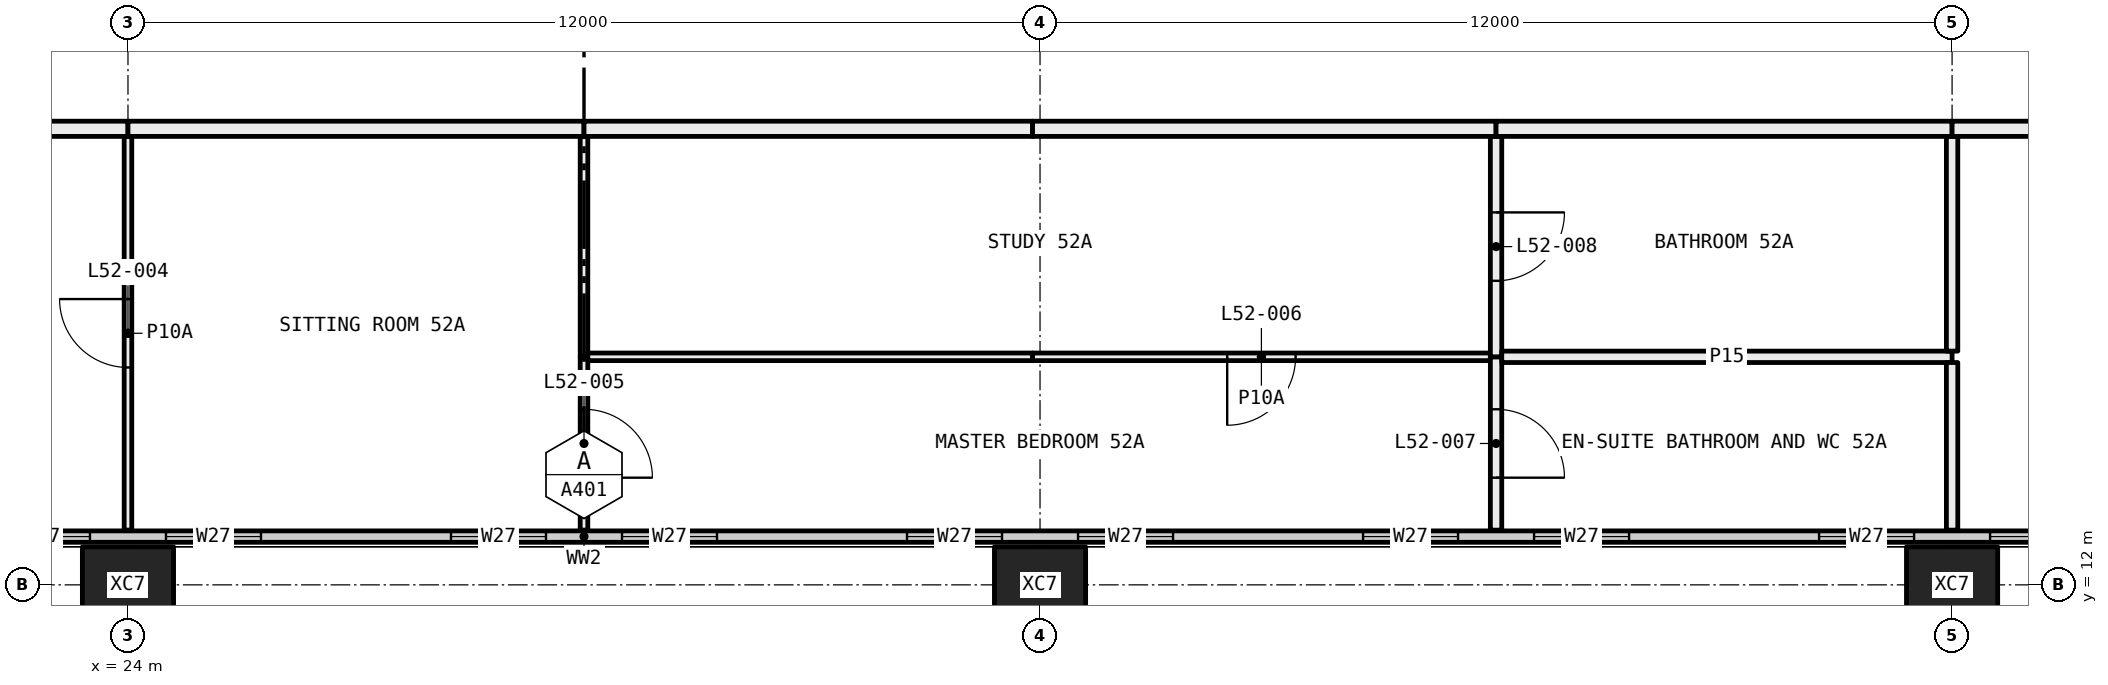
"""IFC4 building model, lengths in metres.
Left out: names, types, materials, properties, quantities, classifications, styles, units other than length and angle.
Written with IfcOpenShell. Run it as: python <this file> out.ifc"""

import sys

from ifc_helpers import new_model, si_unit, direction, frame, frame_2d, origin, origin_2d, place, context, subcontext, project, spatial, rectangle, hollow_rectangle, extrude, element, fill, save


model = new_model("IFC4")
c1 = context("Model", 3, precision=1e-05, world=origin(), true_north=direction((0.0, 1.0)))
c2 = subcontext(c1, "Body", "Model", "MODEL_VIEW")
j1 = project(units=[si_unit("LENGTHUNIT", "METRE"), si_unit("PLANEANGLEUNIT", "RADIAN")], contexts=[c1])
p1 = place(None, origin())
s1 = spatial("IfcSite", under=j1, at=p1, CompositionType="ELEMENT")
p2 = place(p1, origin())
s2 = spatial("IfcBuilding", under=s1, at=p2, CompositionType="ELEMENT")
p3 = place(p2, frame((0.0, 0.0, 196.2)))
s3 = spatial("IfcBuildingStorey", under=s2, at=p3, CompositionType="ELEMENT", Elevation=196.2)
for number, where, z_axis, x_axis in (
    (1, (24.0, 12.0, -0.4), (0.0, 0.0, 1.0), (1.0, 0.0, 0.0)),
    (2, (36.0, 12.0, -0.4), (0.0, 0.0, 1.0), (1.0, 0.0, 0.0)),
    (3, (48.0, 12.0, -0.4), (0.0, 0.0, 1.0), (1.0, 0.0, 0.0)),
):
    element("IfcColumn", number, at=place(p3, frame(where, z_axis=z_axis, x_axis=x_axis)), inside=s3, PredefinedType="COLUMN", context=c2, shape_type="SweptSolid", body=[
        extrude(hollow_rectangle(XDim=1.2, YDim=1.0, WallThickness=0.045, at=origin_2d()), origin(), (0.0, 0.0, 1.0), 3.45),
    ])
p4 = place(p3, frame((6.56, 12.635, 0.0), z_axis=(0.0, 0.0, 1.0), x_axis=(1.0, 0.0, 0.0)))
e4 = element("IfcWall", 4, at=p4, inside=s3, PredefinedType="ELEMENTEDWALL", context=c2, shape_type="SweptSolid", body=[
    extrude(rectangle(XDim=46.88, YDim=0.15, at=frame_2d((23.44, 0.0))), origin(), (0.0, 0.0, 1.0), 3.05),
])
p5 = place(p4, frame((0.44, 0.0, 0.45)))
e5 = element("IfcOpeningElement", 5, at=p5, cuts=e4, PredefinedType="OPENING", context=c2, shape_type="SweptSolid", body=[
    extrude(rectangle(XDim=4.5, YDim=2.55, at=frame_2d((2.25, 1.275))), frame((0.0, 0.085, 0.0), z_axis=(0.0, -1.0, 0.0), x_axis=(1.0, 0.0, 0.0)), (0.0, 0.0, 1.0), 0.17),
])
p6 = place(p4, frame((5.94, 0.0, 0.45)))
e6 = element("IfcOpeningElement", 6, at=p6, cuts=e4, PredefinedType="OPENING", context=c2, shape_type="SweptSolid", body=[
    extrude(rectangle(XDim=1.25, YDim=2.55, at=frame_2d((0.625, 1.275))), frame((0.0, 0.085, 0.0), z_axis=(0.0, -1.0, 0.0), x_axis=(1.0, 0.0, 0.0)), (0.0, 0.0, 1.0), 0.17),
])
p7 = place(p4, frame((9.69, 0.0, 0.45)))
e7 = element("IfcOpeningElement", 7, at=p7, cuts=e4, PredefinedType="OPENING", context=c2, shape_type="SweptSolid", body=[
    extrude(rectangle(XDim=1.25, YDim=2.55, at=frame_2d((0.625, 1.275))), frame((0.0, 0.085, 0.0), z_axis=(0.0, -1.0, 0.0), x_axis=(1.0, 0.0, 0.0)), (0.0, 0.0, 1.0), 0.17),
])
p8 = place(p4, frame((11.94, 0.0, 0.45)))
e8 = element("IfcOpeningElement", 8, at=p8, cuts=e4, PredefinedType="OPENING", context=c2, shape_type="SweptSolid", body=[
    extrude(rectangle(XDim=1.25, YDim=2.55, at=frame_2d((0.625, 1.275))), frame((0.0, 0.085, 0.0), z_axis=(0.0, -1.0, 0.0), x_axis=(1.0, 0.0, 0.0)), (0.0, 0.0, 1.0), 0.17),
])
p9 = place(p4, frame((15.69, 0.0, 0.45)))
e9 = element("IfcOpeningElement", 9, at=p9, cuts=e4, PredefinedType="OPENING", context=c2, shape_type="SweptSolid", body=[
    extrude(rectangle(XDim=1.25, YDim=2.55, at=frame_2d((0.625, 1.275))), frame((0.0, 0.085, 0.0), z_axis=(0.0, -1.0, 0.0), x_axis=(1.0, 0.0, 0.0)), (0.0, 0.0, 1.0), 0.17),
])
p10 = place(p4, frame((17.94, 0.0, 0.45)))
e10 = element("IfcOpeningElement", 10, at=p10, cuts=e4, PredefinedType="OPENING", context=c2, shape_type="SweptSolid", body=[
    extrude(rectangle(XDim=1.25, YDim=2.55, at=frame_2d((0.625, 1.275))), frame((0.0, 0.085, 0.0), z_axis=(0.0, -1.0, 0.0), x_axis=(1.0, 0.0, 0.0)), (0.0, 0.0, 1.0), 0.17),
])
p11 = place(p4, frame((21.69, 0.0, 0.45)))
e11 = element("IfcOpeningElement", 11, at=p11, cuts=e4, PredefinedType="OPENING", context=c2, shape_type="SweptSolid", body=[
    extrude(rectangle(XDim=1.25, YDim=2.55, at=frame_2d((0.625, 1.275))), frame((0.0, 0.085, 0.0), z_axis=(0.0, -1.0, 0.0), x_axis=(1.0, 0.0, 0.0)), (0.0, 0.0, 1.0), 0.17),
])
p12 = place(p4, frame((23.94, 0.0, 0.45)))
e12 = element("IfcOpeningElement", 12, at=p12, cuts=e4, PredefinedType="OPENING", context=c2, shape_type="SweptSolid", body=[
    extrude(rectangle(XDim=1.25, YDim=2.55, at=frame_2d((0.625, 1.275))), frame((0.0, 0.085, 0.0), z_axis=(0.0, -1.0, 0.0), x_axis=(1.0, 0.0, 0.0)), (0.0, 0.0, 1.0), 0.17),
])
p13 = place(p4, frame((27.69, 0.0, 0.45)))
e13 = element("IfcOpeningElement", 13, at=p13, cuts=e4, PredefinedType="OPENING", context=c2, shape_type="SweptSolid", body=[
    extrude(rectangle(XDim=1.25, YDim=2.55, at=frame_2d((0.625, 1.275))), frame((0.0, 0.085, 0.0), z_axis=(0.0, -1.0, 0.0), x_axis=(1.0, 0.0, 0.0)), (0.0, 0.0, 1.0), 0.17),
])
p14 = place(p4, frame((29.94, 0.0, 0.45)))
e14 = element("IfcOpeningElement", 14, at=p14, cuts=e4, PredefinedType="OPENING", context=c2, shape_type="SweptSolid", body=[
    extrude(rectangle(XDim=1.25, YDim=2.55, at=frame_2d((0.625, 1.275))), frame((0.0, 0.085, 0.0), z_axis=(0.0, -1.0, 0.0), x_axis=(1.0, 0.0, 0.0)), (0.0, 0.0, 1.0), 0.17),
])
p15 = place(p4, frame((33.69, 0.0, 0.45)))
e15 = element("IfcOpeningElement", 15, at=p15, cuts=e4, PredefinedType="OPENING", context=c2, shape_type="SweptSolid", body=[
    extrude(rectangle(XDim=1.25, YDim=2.55, at=frame_2d((0.625, 1.275))), frame((0.0, 0.085, 0.0), z_axis=(0.0, -1.0, 0.0), x_axis=(1.0, 0.0, 0.0)), (0.0, 0.0, 1.0), 0.17),
])
p16 = place(p4, frame((35.94, 0.0, 0.45)))
e16 = element("IfcOpeningElement", 16, at=p16, cuts=e4, PredefinedType="OPENING", context=c2, shape_type="SweptSolid", body=[
    extrude(rectangle(XDim=1.25, YDim=2.55, at=frame_2d((0.625, 1.275))), frame((0.0, 0.085, 0.0), z_axis=(0.0, -1.0, 0.0), x_axis=(1.0, 0.0, 0.0)), (0.0, 0.0, 1.0), 0.17),
])
p17 = place(p4, frame((39.69, 0.0, 0.45)))
e17 = element("IfcOpeningElement", 17, at=p17, cuts=e4, PredefinedType="OPENING", context=c2, shape_type="SweptSolid", body=[
    extrude(rectangle(XDim=1.25, YDim=2.55, at=frame_2d((0.625, 1.275))), frame((0.0, 0.085, 0.0), z_axis=(0.0, -1.0, 0.0), x_axis=(1.0, 0.0, 0.0)), (0.0, 0.0, 1.0), 0.17),
])
p18 = place(p4, frame((41.94, 0.0, 0.45)))
e18 = element("IfcOpeningElement", 18, at=p18, cuts=e4, PredefinedType="OPENING", context=c2, shape_type="SweptSolid", body=[
    extrude(rectangle(XDim=4.5, YDim=2.55, at=frame_2d((2.25, 1.275))), frame((0.0, 0.085, 0.0), z_axis=(0.0, -1.0, 0.0), x_axis=(1.0, 0.0, 0.0)), (0.0, 0.0, 1.0), 0.17),
])
p19 = place(p3, frame((24.0, 12.72, 0.0), z_axis=(0.0, 0.0, 1.0), x_axis=(0.0, 1.0, 0.0)))
e19 = element("IfcWall", 19, at=p19, inside=s3, PredefinedType="PARTITIONING", context=c2, shape_type="SweptSolid", body=[
    extrude(rectangle(XDim=5.18, YDim=0.1, at=frame_2d((2.59, 0.0))), origin(), (0.0, 0.0, 1.0), 3.05),
])
p20 = place(p19, frame((2.14, 0.0, 0.0)))
e20 = element("IfcOpeningElement", 20, at=p20, cuts=e19, PredefinedType="OPENING", context=c2, shape_type="SweptSolid", body=[
    extrude(rectangle(XDim=0.9, YDim=2.1, at=frame_2d((0.45, 1.05))), frame((0.0, 0.06, 0.0), z_axis=(0.0, -1.0, 0.0), x_axis=(1.0, 0.0, 0.0)), (0.0, 0.0, 1.0), 0.12),
])
p21 = place(p3, frame((24.0, 18.0, 0.0), z_axis=(0.0, 0.0, 1.0), x_axis=(-1.0, 0.0, 0.0)))
e21 = element("IfcWall", 21, at=p21, inside=s3, PredefinedType="PARTITIONING", context=c2, shape_type="SweptSolid", body=[
    extrude(rectangle(XDim=6.0, YDim=0.2, at=frame_2d((3.0, 0.0))), origin(), (0.0, 0.0, 1.0), 3.05),
])
p22 = place(p3, frame((30.0, 12.72, 0.0), z_axis=(0.0, 0.0, 1.0), x_axis=(0.0, 1.0, 0.0)))
e22 = element("IfcWall", 22, at=p22, inside=s3, PredefinedType="PARTITIONING", context=c2, shape_type="SweptSolid", body=[
    extrude(rectangle(XDim=2.28, YDim=0.1, at=frame_2d((1.14, 0.0))), origin(), (0.0, 0.0, 1.0), 3.05),
])
p23 = place(p22, frame((0.69, 0.0, 0.0)))
e23 = element("IfcOpeningElement", 23, at=p23, cuts=e22, PredefinedType="OPENING", context=c2, shape_type="SweptSolid", body=[
    extrude(rectangle(XDim=0.9, YDim=2.1, at=frame_2d((0.45, 1.05))), frame((0.0, 0.06, 0.0), z_axis=(0.0, -1.0, 0.0), x_axis=(1.0, 0.0, 0.0)), (0.0, 0.0, 1.0), 0.12),
])
p24 = place(p3, frame((30.0, 15.0, 0.0), z_axis=(0.0, 0.0, 1.0), x_axis=(0.0, 1.0, 0.0)))
e24 = element("IfcWall", 24, at=p24, inside=s3, PredefinedType="PARTITIONING", context=c2, shape_type="SweptSolid", body=[
    extrude(rectangle(XDim=2.9, YDim=0.1, at=frame_2d((1.45, 0.0))), origin(), (0.0, 0.0, 1.0), 3.05),
])
p25 = place(p3, frame((30.0, 18.0, 0.0), z_axis=(0.0, 0.0, 1.0), x_axis=(-1.0, 0.0, 0.0)))
e25 = element("IfcWall", 25, at=p25, inside=s3, PredefinedType="PARTITIONING", context=c2, shape_type="SweptSolid", body=[
    extrude(rectangle(XDim=6.0, YDim=0.2, at=frame_2d((3.0, 0.0))), origin(), (0.0, 0.0, 1.0), 3.05),
])
p26 = place(p3, frame((41.925, 15.0, 0.0), z_axis=(0.0, 0.0, 1.0), x_axis=(-1.0, 0.0, 0.0)))
e26 = element("IfcWall", 26, at=p26, inside=s3, PredefinedType="PARTITIONING", context=c2, shape_type="SweptSolid", body=[
    extrude(rectangle(XDim=6.025, YDim=0.1, at=frame_2d((3.013, 0.0))), origin(), (0.0, 0.0, 1.0), 2.45),
])
p27 = place(p26, frame((2.562, 0.0, 0.0)))
e27 = element("IfcOpeningElement", 27, at=p27, cuts=e26, PredefinedType="OPENING", context=c2, shape_type="SweptSolid", body=[
    extrude(rectangle(XDim=0.9, YDim=2.1, at=frame_2d((0.45, 1.05))), frame((0.0, 0.06, 0.0), z_axis=(0.0, -1.0, 0.0), x_axis=(1.0, 0.0, 0.0)), (0.0, 0.0, 1.0), 0.12),
])
p28 = place(p3, frame((35.9, 15.0, 0.0), z_axis=(0.0, 0.0, 1.0), x_axis=(-1.0, 0.0, 0.0)))
e28 = element("IfcWall", 28, at=p28, inside=s3, PredefinedType="PARTITIONING", context=c2, shape_type="SweptSolid", body=[
    extrude(rectangle(XDim=5.85, YDim=0.1, at=frame_2d((2.925, 0.0))), origin(), (0.0, 0.0, 1.0), 3.05),
])
p29 = place(p3, frame((42.0, 12.72, 0.0), z_axis=(0.0, 0.0, 1.0), x_axis=(0.0, 1.0, 0.0)))
e29 = element("IfcWall", 29, at=p29, inside=s3, PredefinedType="PARTITIONING", context=c2, shape_type="SweptSolid", body=[
    extrude(rectangle(XDim=2.28, YDim=0.15, at=frame_2d((1.14, 0.0))), origin(), (0.0, 0.0, 1.0), 3.05),
])
p30 = place(p29, frame((0.69, 0.0, 0.0)))
e30 = element("IfcOpeningElement", 30, at=p30, cuts=e29, PredefinedType="OPENING", context=c2, shape_type="SweptSolid", body=[
    extrude(rectangle(XDim=0.9, YDim=2.1, at=frame_2d((0.45, 1.05))), frame((0.0, 0.085, 0.0), z_axis=(0.0, -1.0, 0.0), x_axis=(1.0, 0.0, 0.0)), (0.0, 0.0, 1.0), 0.17),
])
p31 = place(p3, frame((42.0, 15.0, 0.0), z_axis=(0.0, 0.0, 1.0), x_axis=(0.0, 1.0, 0.0)))
e31 = element("IfcWall", 31, at=p31, inside=s3, PredefinedType="PARTITIONING", context=c2, shape_type="SweptSolid", body=[
    extrude(rectangle(XDim=2.9, YDim=0.15, at=frame_2d((1.45, 0.0))), origin(), (0.0, 0.0, 1.0), 3.05),
])
p32 = place(p31, frame((1.0, 0.0, 0.0)))
e32 = element("IfcOpeningElement", 32, at=p32, cuts=e31, PredefinedType="OPENING", context=c2, shape_type="SweptSolid", body=[
    extrude(rectangle(XDim=0.9, YDim=2.1, at=frame_2d((0.45, 1.05))), frame((0.0, 0.085, 0.0), z_axis=(0.0, -1.0, 0.0), x_axis=(1.0, 0.0, 0.0)), (0.0, 0.0, 1.0), 0.17),
])
p33 = place(p3, frame((42.0, 18.0, 0.0), z_axis=(0.0, 0.0, 1.0), x_axis=(-1.0, 0.0, 0.0)))
e33 = element("IfcWall", 33, at=p33, inside=s3, PredefinedType="PARTITIONING", context=c2, shape_type="SweptSolid", body=[
    extrude(rectangle(XDim=6.1, YDim=0.2, at=frame_2d((3.05, 0.0))), origin(), (0.0, 0.0, 1.0), 2.45),
])
p34 = place(p3, frame((35.9, 18.0, 0.0), z_axis=(0.0, 0.0, 1.0), x_axis=(-1.0, 0.0, 0.0)))
e34 = element("IfcWall", 34, at=p34, inside=s3, PredefinedType="PARTITIONING", context=c2, shape_type="SweptSolid", body=[
    extrude(rectangle(XDim=5.9, YDim=0.2, at=frame_2d((2.95, 0.0))), origin(), (0.0, 0.0, 1.0), 3.05),
])
p35 = place(p3, frame((48.0, 15.0, 0.0), z_axis=(0.0, 0.0, 1.0), x_axis=(-1.0, 0.0, 0.0)))
e35 = element("IfcWall", 35, at=p35, inside=s3, PredefinedType="PARTITIONING", context=c2, shape_type="SweptSolid", body=[
    extrude(rectangle(XDim=5.925, YDim=0.15, at=frame_2d((2.962, 0.0))), origin(), (0.0, 0.0, 1.0), 3.05),
])
p36 = place(p3, frame((48.0, 12.72, 0.0), z_axis=(0.0, 0.0, 1.0), x_axis=(0.0, 1.0, 0.0)))
e36 = element("IfcWall", 36, at=p36, inside=s3, PredefinedType="PARTITIONING", context=c2, shape_type="SweptSolid", body=[
    extrude(rectangle(XDim=2.205, YDim=0.15, at=frame_2d((1.103, 0.0))), origin(), (0.0, 0.0, 1.0), 3.05),
])
p37 = place(p3, frame((48.0, 15.075, 0.0), z_axis=(0.0, 0.0, 1.0), x_axis=(0.0, 1.0, 0.0)))
e37 = element("IfcWall", 37, at=p37, inside=s3, PredefinedType="PARTITIONING", context=c2, shape_type="SweptSolid", body=[
    extrude(rectangle(XDim=2.825, YDim=0.15, at=frame_2d((1.413, 0.0))), origin(), (0.0, 0.0, 1.0), 3.05),
])
p38 = place(p3, frame((48.0, 18.0, 0.0), z_axis=(0.0, 0.0, 1.0), x_axis=(-1.0, 0.0, 0.0)))
e38 = element("IfcWall", 38, at=p38, inside=s3, PredefinedType="PARTITIONING", context=c2, shape_type="SweptSolid", body=[
    extrude(rectangle(XDim=6.0, YDim=0.2, at=frame_2d((3.0, 0.0))), origin(), (0.0, 0.0, 1.0), 3.05),
])
p39 = place(p3, frame((53.28, 18.0, 0.0), z_axis=(0.0, 0.0, 1.0), x_axis=(-1.0, 0.0, 0.0)))
e39 = element("IfcWall", 39, at=p39, inside=s3, PredefinedType="PARTITIONING", context=c2, shape_type="SweptSolid", body=[
    extrude(rectangle(XDim=5.28, YDim=0.2, at=frame_2d((2.64, 0.0))), origin(), (0.0, 0.0, 1.0), 3.05),
])
p40 = place(p39, frame((2.19, 0.0, 0.0)))
e40 = element("IfcOpeningElement", 40, at=p40, cuts=e39, PredefinedType="OPENING", context=c2, shape_type="SweptSolid", body=[
    extrude(rectangle(XDim=0.9, YDim=2.1, at=frame_2d((0.45, 1.05))), frame((0.0, 0.11, 0.0), z_axis=(0.0, -1.0, 0.0), x_axis=(1.0, 0.0, 0.0)), (0.0, 0.0, 1.0), 0.22),
])
p41 = place(p9, origin())
e41 = element("IfcWindow", 41, at=p41, inside=s3, PartitioningType="SINGLE_PANEL", PredefinedType="WINDOW", context=c2, shape_type="SweptSolid", body=[
    extrude(rectangle(XDim=1.25, YDim=2.55, at=frame_2d((0.625, 1.275))), frame((0.0, 0.03, 0.0), z_axis=(0.0, -1.0, 0.0), x_axis=(1.0, 0.0, 0.0)), (0.0, 0.0, 1.0), 0.06),
])
fill(e9, e41)
p42 = place(p10, origin())
e42 = element("IfcWindow", 42, at=p42, inside=s3, PartitioningType="SINGLE_PANEL", PredefinedType="WINDOW", context=c2, shape_type="SweptSolid", body=[
    extrude(rectangle(XDim=1.25, YDim=2.55, at=frame_2d((0.625, 1.275))), frame((0.0, 0.03, 0.0), z_axis=(0.0, -1.0, 0.0), x_axis=(1.0, 0.0, 0.0)), (0.0, 0.0, 1.0), 0.06),
])
fill(e10, e42)
p43 = place(p11, origin())
e43 = element("IfcWindow", 43, at=p43, inside=s3, PartitioningType="SINGLE_PANEL", PredefinedType="WINDOW", context=c2, shape_type="SweptSolid", body=[
    extrude(rectangle(XDim=1.25, YDim=2.55, at=frame_2d((0.625, 1.275))), frame((0.0, 0.03, 0.0), z_axis=(0.0, -1.0, 0.0), x_axis=(1.0, 0.0, 0.0)), (0.0, 0.0, 1.0), 0.06),
])
fill(e11, e43)
p44 = place(p12, origin())
e44 = element("IfcWindow", 44, at=p44, inside=s3, PartitioningType="SINGLE_PANEL", PredefinedType="WINDOW", context=c2, shape_type="SweptSolid", body=[
    extrude(rectangle(XDim=1.25, YDim=2.55, at=frame_2d((0.625, 1.275))), frame((0.0, 0.03, 0.0), z_axis=(0.0, -1.0, 0.0), x_axis=(1.0, 0.0, 0.0)), (0.0, 0.0, 1.0), 0.06),
])
fill(e12, e44)
p45 = place(p13, origin())
e45 = element("IfcWindow", 45, at=p45, inside=s3, PartitioningType="SINGLE_PANEL", PredefinedType="WINDOW", context=c2, shape_type="SweptSolid", body=[
    extrude(rectangle(XDim=1.25, YDim=2.55, at=frame_2d((0.625, 1.275))), frame((0.0, 0.03, 0.0), z_axis=(0.0, -1.0, 0.0), x_axis=(1.0, 0.0, 0.0)), (0.0, 0.0, 1.0), 0.06),
])
fill(e13, e45)
p46 = place(p14, origin())
e46 = element("IfcWindow", 46, at=p46, inside=s3, PartitioningType="SINGLE_PANEL", PredefinedType="WINDOW", context=c2, shape_type="SweptSolid", body=[
    extrude(rectangle(XDim=1.25, YDim=2.55, at=frame_2d((0.625, 1.275))), frame((0.0, 0.03, 0.0), z_axis=(0.0, -1.0, 0.0), x_axis=(1.0, 0.0, 0.0)), (0.0, 0.0, 1.0), 0.06),
])
fill(e14, e46)
p47 = place(p15, origin())
e47 = element("IfcWindow", 47, at=p47, inside=s3, PartitioningType="SINGLE_PANEL", PredefinedType="WINDOW", context=c2, shape_type="SweptSolid", body=[
    extrude(rectangle(XDim=1.25, YDim=2.55, at=frame_2d((0.625, 1.275))), frame((0.0, 0.03, 0.0), z_axis=(0.0, -1.0, 0.0), x_axis=(1.0, 0.0, 0.0)), (0.0, 0.0, 1.0), 0.06),
])
fill(e15, e47)
p48 = place(p16, origin())
e48 = element("IfcWindow", 48, at=p48, inside=s3, PartitioningType="SINGLE_PANEL", PredefinedType="WINDOW", context=c2, shape_type="SweptSolid", body=[
    extrude(rectangle(XDim=1.25, YDim=2.55, at=frame_2d((0.625, 1.275))), frame((0.0, 0.03, 0.0), z_axis=(0.0, -1.0, 0.0), x_axis=(1.0, 0.0, 0.0)), (0.0, 0.0, 1.0), 0.06),
])
fill(e16, e48)
p49 = place(p17, origin())
e49 = element("IfcWindow", 49, at=p49, inside=s3, PartitioningType="SINGLE_PANEL", PredefinedType="WINDOW", context=c2, shape_type="SweptSolid", body=[
    extrude(rectangle(XDim=1.25, YDim=2.55, at=frame_2d((0.625, 1.275))), frame((0.0, 0.03, 0.0), z_axis=(0.0, -1.0, 0.0), x_axis=(1.0, 0.0, 0.0)), (0.0, 0.0, 1.0), 0.06),
])
fill(e17, e49)
p50 = place(p18, origin())
e50 = element("IfcWindow", 50, at=p50, inside=s3, PartitioningType="SINGLE_PANEL", PredefinedType="WINDOW", context=c2, shape_type="SweptSolid", body=[
    extrude(rectangle(XDim=4.5, YDim=2.55, at=frame_2d((2.25, 1.275))), frame((0.0, 0.03, 0.0), z_axis=(0.0, -1.0, 0.0), x_axis=(1.0, 0.0, 0.0)), (0.0, 0.0, 1.0), 0.06),
])
fill(e18, e50)
p51 = place(p20, origin())
e51 = element("IfcDoor", 51, at=p51, inside=s3, OperationType="SINGLE_SWING_LEFT", PredefinedType="DOOR", context=c2, shape_type="SweptSolid", body=[
    extrude(rectangle(XDim=0.9, YDim=2.1, at=frame_2d((0.45, 1.05))), frame((0.0, 0.025, 0.0), z_axis=(0.0, -1.0, 0.0), x_axis=(1.0, 0.0, 0.0)), (0.0, 0.0, 1.0), 0.05),
])
fill(e20, e51)
p52 = place(p23, frame((0.9, 0.0, 0.0), x_axis=(-1.0, 0.0, 0.0)))
e52 = element("IfcDoor", 52, at=p52, inside=s3, OperationType="SINGLE_SWING_LEFT", PredefinedType="DOOR", context=c2, shape_type="SweptSolid", body=[
    extrude(rectangle(XDim=0.9, YDim=2.1, at=frame_2d((0.45, 1.05))), frame((0.0, 0.025, 0.0), z_axis=(0.0, -1.0, 0.0), x_axis=(1.0, 0.0, 0.0)), (0.0, 0.0, 1.0), 0.05),
])
fill(e23, e52)
p53 = place(p27, origin())
e53 = element("IfcDoor", 53, at=p53, inside=s3, OperationType="SINGLE_SWING_LEFT", PredefinedType="DOOR", context=c2, shape_type="SweptSolid", body=[
    extrude(rectangle(XDim=0.9, YDim=2.1, at=frame_2d((0.45, 1.05))), frame((0.0, 0.025, 0.0), z_axis=(0.0, -1.0, 0.0), x_axis=(1.0, 0.0, 0.0)), (0.0, 0.0, 1.0), 0.05),
])
fill(e27, e53)
p54 = place(p30, frame((0.9, 0.0, 0.0), x_axis=(-1.0, 0.0, 0.0)))
e54 = element("IfcDoor", 54, at=p54, inside=s3, OperationType="SINGLE_SWING_LEFT", PredefinedType="DOOR", context=c2, shape_type="SweptSolid", body=[
    extrude(rectangle(XDim=0.9, YDim=2.1, at=frame_2d((0.45, 1.05))), frame((0.0, 0.025, 0.0), z_axis=(0.0, -1.0, 0.0), x_axis=(1.0, 0.0, 0.0)), (0.0, 0.0, 1.0), 0.05),
])
fill(e30, e54)
p55 = place(p32, frame((0.9, 0.0, 0.0), x_axis=(-1.0, 0.0, 0.0)))
e55 = element("IfcDoor", 55, at=p55, inside=s3, OperationType="SINGLE_SWING_RIGHT", PredefinedType="DOOR", context=c2, shape_type="SweptSolid", body=[
    extrude(rectangle(XDim=0.9, YDim=2.1, at=frame_2d((0.45, 1.05))), frame((0.0, 0.025, 0.0), z_axis=(0.0, -1.0, 0.0), x_axis=(1.0, 0.0, 0.0)), (0.0, 0.0, 1.0), 0.05),
])
fill(e32, e55)
save(model, sys.argv[1])
